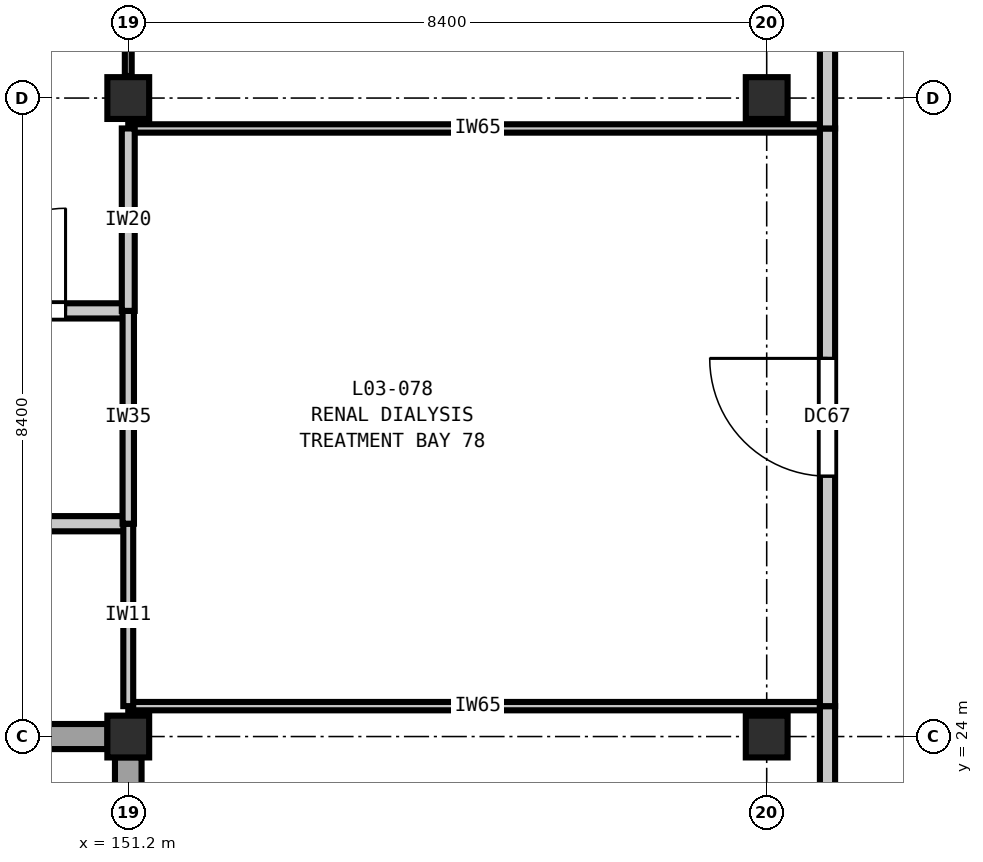
"""IFC4 building model, lengths in metres.
Left out: names, types, materials, properties, quantities, classifications, styles, units other than length and angle.
Written with IfcOpenShell. Run it as: python <this file> out.ifc"""

import sys

from ifc_helpers import new_model, si_unit, direction, frame, frame_2d, origin, origin_2d, place, context, subcontext, project, spatial, rectangle, extrude, element, fill, save


model = new_model("IFC4")
c1 = context("Model", 3, precision=1e-05, world=origin(), true_north=direction((0.0, 1.0)))
c2 = subcontext(c1, "Body", "Model", "MODEL_VIEW")
j1 = project(units=[si_unit("LENGTHUNIT", "METRE"), si_unit("PLANEANGLEUNIT", "RADIAN")], contexts=[c1])
p1 = place(None, origin())
s1 = spatial("IfcSite", under=j1, at=p1, CompositionType="ELEMENT")
p2 = place(p1, origin())
s2 = spatial("IfcBuilding", under=s1, at=p2, CompositionType="ELEMENT")
p3 = place(p2, frame((0.0, 0.0, 16.2)))
s3 = spatial("IfcBuildingStorey", under=s2, at=p3, CompositionType="ELEMENT", Elevation=16.2)
for number, where, z_axis, x_axis in (
    (1, (151.2, 24.0, 0.0), (0.0, 0.0, 1.0), (1.0, 0.0, 0.0)),
    (2, (151.2, 32.4, 0.0), (0.0, 0.0, 1.0), (1.0, 0.0, 0.0)),
    (3, (159.6, 24.0, 0.0), (0.0, 0.0, 1.0), (1.0, 0.0, 0.0)),
    (4, (159.6, 32.4, 0.0), (0.0, 0.0, 1.0), (1.0, 0.0, 0.0)),
):
    element("IfcColumn", number, at=place(p3, frame(where, z_axis=z_axis, x_axis=x_axis)), inside=s3, PredefinedType="COLUMN", context=c2, shape_type="SweptSolid", body=[
        extrude(rectangle(XDim=0.55, YDim=0.55, at=origin_2d()), origin(), (0.0, 0.0, 1.0), 4.2),
    ])
p4 = place(p3, frame((151.2, 15.873, 0.0), z_axis=(0.0, 0.0, 1.0), x_axis=(0.0, 1.0, 0.0)))
e5 = element("IfcWall", 5, at=p4, inside=s3, PredefinedType="SOLIDWALL", context=c2, shape_type="SweptSolid", body=[
    extrude(rectangle(XDim=7.854, YDim=0.35, at=frame_2d((3.927, 0.0))), origin(), (0.0, 0.0, 1.0), 3.48),
])
p5 = place(p4, frame((3.377, 0.0, 0.9)))
e6 = element("IfcOpeningElement", 6, at=p5, cuts=e5, PredefinedType="OPENING", context=c2, shape_type="SweptSolid", body=[
    extrude(rectangle(XDim=1.1, YDim=1.95, at=frame_2d((0.55, 0.975))), frame((0.0, 0.185, 0.0), z_axis=(0.0, -1.0, 0.0), x_axis=(1.0, 0.0, 0.0)), (0.0, 0.0, 1.0), 0.37),
])
p6 = place(p3, frame((150.927, 24.0, 0.0), z_axis=(0.0, 0.0, 1.0), x_axis=(-1.0, 0.0, 0.0)))
e7 = element("IfcWall", 7, at=p6, inside=s3, PredefinedType="SOLIDWALL", context=c2, shape_type="SweptSolid", body=[
    extrude(rectangle(XDim=7.854, YDim=0.33, at=frame_2d((3.927, 0.0))), origin(), (0.0, 0.0, 1.0), 3.48),
])
p7 = place(p6, frame((3.302, 0.0, 0.9)))
e8 = element("IfcOpeningElement", 8, at=p7, cuts=e7, PredefinedType="OPENING", context=c2, shape_type="SweptSolid", body=[
    extrude(rectangle(XDim=1.25, YDim=1.95, at=frame_2d((0.625, 0.975))), frame((0.0, 0.175, 0.0), z_axis=(0.0, -1.0, 0.0), x_axis=(1.0, 0.0, 0.0)), (0.0, 0.0, 1.0), 0.35),
])
p8 = place(p3, frame((151.2, 24.4, 0.0), z_axis=(0.0, 0.0, 1.0), x_axis=(1.0, 0.0, 0.0)))
e9 = element("IfcWall", 9, at=p8, inside=s3, PredefinedType="PARTITIONING", context=c2, shape_type="SweptSolid", body=[
    extrude(rectangle(XDim=9.2, YDim=0.11, at=frame_2d((4.6, 0.0))), origin(), (0.0, 0.0, 1.0), 3.89),
])
p9 = place(p3, frame((142.0, 26.8, 0.0), z_axis=(0.0, 0.0, 1.0), x_axis=(1.0, 0.0, 0.0)))
e10 = element("IfcWall", 10, at=p9, inside=s3, PredefinedType="PARTITIONING", context=c2, shape_type="SweptSolid", body=[
    extrude(rectangle(XDim=9.2, YDim=0.2, at=frame_2d((4.6, 0.0))), origin(), (0.0, 0.0, 1.0), 3.89),
])
p10 = place(p9, frame((3.75, 0.0, 0.0)))
e11 = element("IfcOpeningElement", 11, at=p10, cuts=e10, PredefinedType="OPENING", context=c2, shape_type="SweptSolid", body=[
    extrude(rectangle(XDim=1.7, YDim=2.3, at=frame_2d((0.85, 1.15))), frame((0.0, 0.11, 0.0), z_axis=(0.0, -1.0, 0.0), x_axis=(1.0, 0.0, 0.0)), (0.0, 0.0, 1.0), 0.22),
])
p11 = place(p3, frame((148.2, 29.6, 0.0), z_axis=(0.0, 0.0, 1.0), x_axis=(1.0, 0.0, 0.0)))
e12 = element("IfcWall", 12, at=p11, inside=s3, PredefinedType="PARTITIONING", context=c2, shape_type="SweptSolid", body=[
    extrude(rectangle(XDim=3.0, YDim=0.2, at=frame_2d((1.5, 0.0))), origin(), (0.0, 0.0, 1.0), 3.89),
])
p12 = place(p11, frame((0.825, 0.0, 0.0)))
e13 = element("IfcOpeningElement", 13, at=p12, cuts=e12, PredefinedType="OPENING", context=c2, shape_type="SweptSolid", body=[
    extrude(rectangle(XDim=1.35, YDim=2.2, at=frame_2d((0.675, 1.1))), frame((0.0, 0.11, 0.0), z_axis=(0.0, -1.0, 0.0), x_axis=(1.0, 0.0, 0.0)), (0.0, 0.0, 1.0), 0.22),
])
p13 = place(p3, frame((151.2, 32.0, 0.0), z_axis=(0.0, 0.0, 1.0), x_axis=(1.0, 0.0, 0.0)))
e14 = element("IfcWall", 14, at=p13, inside=s3, PredefinedType="PARTITIONING", context=c2, shape_type="SweptSolid", body=[
    extrude(rectangle(XDim=9.2, YDim=0.11, at=frame_2d((4.6, 0.0))), origin(), (0.0, 0.0, 1.0), 3.89),
])
p14 = place(p3, frame((151.2, 24.4, 0.0), z_axis=(0.0, 0.0, 1.0), x_axis=(0.0, 1.0, 0.0)))
e15 = element("IfcWall", 15, at=p14, inside=s3, PredefinedType="PARTITIONING", context=c2, shape_type="SweptSolid", body=[
    extrude(rectangle(XDim=2.4, YDim=0.13, at=frame_2d((1.2, 0.0))), origin(), (0.0, 0.0, 1.0), 3.585),
])
p15 = place(p3, frame((151.2, 26.8, 0.0), z_axis=(0.0, 0.0, 1.0), x_axis=(0.0, 1.0, 0.0)))
e16 = element("IfcWall", 16, at=p15, inside=s3, PredefinedType="PARTITIONING", context=c2, shape_type="SweptSolid", body=[
    extrude(rectangle(XDim=2.8, YDim=0.15, at=frame_2d((1.4, 0.0))), origin(), (0.0, 0.0, 1.0), 3.585),
])
p16 = place(p3, frame((151.2, 29.6, 0.0), z_axis=(0.0, 0.0, 1.0), x_axis=(0.0, 1.0, 0.0)))
e17 = element("IfcWall", 17, at=p16, inside=s3, PredefinedType="PARTITIONING", context=c2, shape_type="SweptSolid", body=[
    extrude(rectangle(XDim=2.4, YDim=0.17, at=frame_2d((1.2, 0.0))), origin(), (0.0, 0.0, 1.0), 3.585),
])
p17 = place(p3, frame((151.2, 32.69, 0.0), z_axis=(0.0, 0.0, 1.0), x_axis=(0.0, 1.0, 0.0)))
e18 = element("IfcWall", 18, at=p17, inside=s3, PredefinedType="PARTITIONING", context=c2, shape_type="SweptSolid", body=[
    extrude(rectangle(XDim=7.71, YDim=0.09, at=frame_2d((3.855, 0.0))), origin(), (0.0, 0.0, 1.0), 3.585),
])
p18 = place(p3, frame((160.4, 16.0, 0.0), z_axis=(0.0, 0.0, 1.0), x_axis=(0.0, 1.0, 0.0)))
e19 = element("IfcWall", 19, at=p18, inside=s3, PredefinedType="PARTITIONING", context=c2, shape_type="SweptSolid", body=[
    extrude(rectangle(XDim=8.4, YDim=0.2, at=frame_2d((4.2, 0.0))), origin(), (0.0, 0.0, 1.0), 3.89),
])
p19 = place(p18, frame((3.475, 0.0, 0.0)))
e20 = element("IfcOpeningElement", 20, at=p19, cuts=e19, PredefinedType="OPENING", context=c2, shape_type="SweptSolid", body=[
    extrude(rectangle(XDim=1.45, YDim=2.25, at=frame_2d((0.725, 1.125))), frame((0.0, 0.11, 0.0), z_axis=(0.0, -1.0, 0.0), x_axis=(1.0, 0.0, 0.0)), (0.0, 0.0, 1.0), 0.22),
])
p20 = place(p3, frame((160.4, 24.4, 0.0), z_axis=(0.0, 0.0, 1.0), x_axis=(0.0, 1.0, 0.0)))
e21 = element("IfcWall", 21, at=p20, inside=s3, PredefinedType="PARTITIONING", context=c2, shape_type="SweptSolid", body=[
    extrude(rectangle(XDim=7.6, YDim=0.2, at=frame_2d((3.8, 0.0))), origin(), (0.0, 0.0, 1.0), 3.89),
])
p21 = place(p20, frame((3.025, 0.0, 0.0)))
e22 = element("IfcOpeningElement", 22, at=p21, cuts=e21, PredefinedType="OPENING", context=c2, shape_type="SweptSolid", body=[
    extrude(rectangle(XDim=1.55, YDim=2.25, at=frame_2d((0.775, 1.125))), frame((0.0, 0.11, 0.0), z_axis=(0.0, -1.0, 0.0), x_axis=(1.0, 0.0, 0.0)), (0.0, 0.0, 1.0), 0.22),
])
p22 = place(p3, frame((160.4, 32.0, 0.0), z_axis=(0.0, 0.0, 1.0), x_axis=(0.0, 1.0, 0.0)))
e23 = element("IfcWall", 23, at=p22, inside=s3, PredefinedType="PARTITIONING", context=c2, shape_type="SweptSolid", body=[
    extrude(rectangle(XDim=8.4, YDim=0.2, at=frame_2d((4.2, 0.0))), origin(), (0.0, 0.0, 1.0), 3.89),
])
p23 = place(p22, frame((3.35, 0.0, 0.0)))
e24 = element("IfcOpeningElement", 24, at=p23, cuts=e23, PredefinedType="OPENING", context=c2, shape_type="SweptSolid", body=[
    extrude(rectangle(XDim=1.7, YDim=2.3, at=frame_2d((0.85, 1.15))), frame((0.0, 0.11, 0.0), z_axis=(0.0, -1.0, 0.0), x_axis=(1.0, 0.0, 0.0)), (0.0, 0.0, 1.0), 0.22),
])
p24 = place(p12, origin())
e25 = element("IfcDoor", 25, at=p24, inside=s3, OperationType="SINGLE_SWING_RIGHT", PredefinedType="DOOR", context=c2, shape_type="SweptSolid", body=[
    extrude(rectangle(XDim=1.35, YDim=2.2, at=frame_2d((0.675, 1.1))), frame((0.0, 0.025, 0.0), z_axis=(0.0, -1.0, 0.0), x_axis=(1.0, 0.0, 0.0)), (0.0, 0.0, 1.0), 0.05),
])
fill(e13, e25)
p25 = place(p21, origin())
e26 = element("IfcDoor", 26, at=p25, inside=s3, OperationType="SINGLE_SWING_RIGHT", PredefinedType="DOOR", context=c2, shape_type="SweptSolid", body=[
    extrude(rectangle(XDim=1.55, YDim=2.25, at=frame_2d((0.775, 1.125))), frame((0.0, 0.025, 0.0), z_axis=(0.0, -1.0, 0.0), x_axis=(1.0, 0.0, 0.0)), (0.0, 0.0, 1.0), 0.05),
])
fill(e22, e26)
save(model, sys.argv[1])
